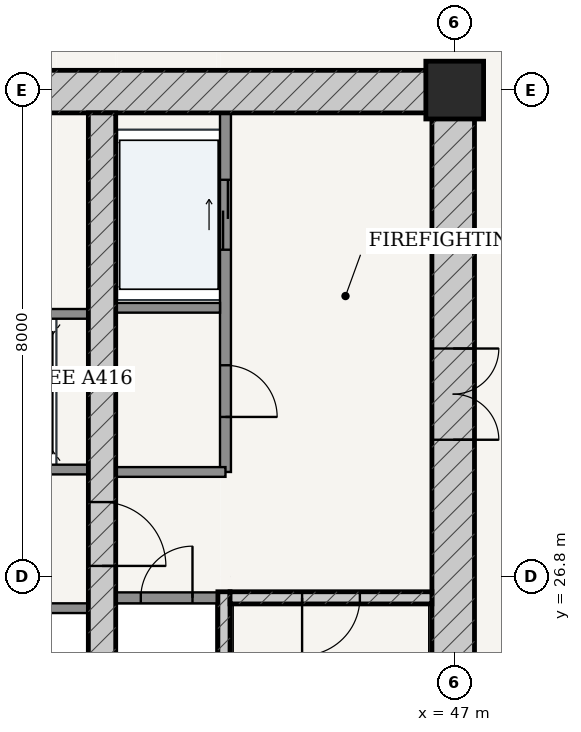
"""IFC4 building model, lengths in metres.
Left out: names, types, materials, properties, quantities, classifications, styles, units other than length and angle.
Written with IfcOpenShell. Run it as: python <this file> out.ifc"""

import sys

from ifc_helpers import new_model, si_unit, direction, frame, frame_2d, origin, origin_2d, place, context, subcontext, project, spatial, rectangle, extrude, source, transform, mapped, element, fill, save


model = new_model("IFC4")
c1 = context("Model", 3, precision=1e-05, world=origin(), true_north=direction((-0.2419218956, 0.970295726276)))
c2 = subcontext(c1, "Body", "Model", "MODEL_VIEW")
j1 = project(units=[si_unit("LENGTHUNIT", "METRE"), si_unit("PLANEANGLEUNIT", "RADIAN")], contexts=[c1])
p1 = place(None, origin())
s1 = spatial("IfcSite", under=j1, at=p1, CompositionType="ELEMENT")
p2 = place(p1, origin())
s2 = spatial("IfcBuilding", under=s1, at=p2, CompositionType="ELEMENT")
p3 = place(p2, frame((0.0, 0.0, 90.6)))
s3 = spatial("IfcBuildingStorey", under=s2, at=p3, CompositionType="ELEMENT", Elevation=90.6)
p4 = place(p3, frame((47.0, 34.8, 0.0), z_axis=(0.0, 0.0, 1.0), x_axis=(1.0, 0.0, 0.0)))
e1 = element("IfcColumn", 1, at=p4, inside=s3, PredefinedType="COLUMN", context=c2, shape_type="SweptSolid", body=[
    extrude(rectangle(XDim=0.95, YDim=0.95, at=origin_2d()), origin(), (0.0, 0.0, 1.0), 3.6),
])
p5 = place(p3, frame((28.675, 34.775, 0.0), z_axis=(0.0, 0.0, 1.0), x_axis=(1.0, 0.0, 0.0)))
e2 = element("IfcWall", 2, at=p5, inside=s3, PredefinedType="SHEAR", context=c2, shape_type="SweptSolid", body=[
    extrude(rectangle(XDim=18.65, YDim=0.7, at=frame_2d((9.325, 0.0))), origin(), (0.0, 0.0, 1.0), 3.325),
])
p6 = place(p5, frame((8.9, 0.0, 0.0)))
e3 = element("IfcOpeningElement", 3, at=p6, cuts=e2, PredefinedType="OPENING", context=c2, shape_type="SweptSolid", body=[
    extrude(rectangle(XDim=0.85, YDim=2.1, at=frame_2d((0.425, 1.05))), frame((0.0, 0.36, 0.0), z_axis=(0.0, -1.0, 0.0), x_axis=(1.0, 0.0, 0.0)), (0.0, 0.0, 1.0), 0.72),
])
p7 = place(p3, frame((46.975, 19.175, 0.0), z_axis=(0.0, 0.0, 1.0), x_axis=(0.0, 1.0, 0.0)))
e4 = element("IfcWall", 4, at=p7, inside=s3, PredefinedType="SHEAR", context=c2, shape_type="SweptSolid", body=[
    extrude(rectangle(XDim=15.25, YDim=0.7, at=frame_2d((7.625, 0.0))), origin(), (0.0, 0.0, 1.0), 3.325),
])
p8 = place(p7, frame((9.875, 0.0, 0.0)))
e5 = element("IfcOpeningElement", 5, at=p8, cuts=e4, PredefinedType="OPENING", context=c2, shape_type="SweptSolid", body=[
    extrude(rectangle(XDim=1.5, YDim=2.2, at=frame_2d((0.75, 1.1))), frame((0.0, 0.36, 0.0), z_axis=(0.0, -1.0, 0.0), x_axis=(1.0, 0.0, 0.0)), (0.0, 0.0, 1.0), 0.72),
])
p9 = place(p3, frame((43.205, 19.175, 0.0), z_axis=(0.0, 0.0, 1.0), x_axis=(0.0, 1.0, 0.0)))
e6 = element("IfcWall", 6, at=p9, inside=s3, PredefinedType="SOLIDWALL", context=c2, shape_type="SweptSolid", body=[
    extrude(rectangle(XDim=7.375, YDim=0.2, at=frame_2d((3.688, 0.0))), origin(), (0.0, 0.0, 1.0), 3.325),
])
p10 = place(p3, frame((43.305, 26.45, 0.0), z_axis=(0.0, 0.0, 1.0), x_axis=(1.0, 0.0, 0.0)))
e7 = element("IfcWall", 7, at=p10, inside=s3, PredefinedType="SOLIDWALL", context=c2, shape_type="SweptSolid", body=[
    extrude(rectangle(XDim=3.32, YDim=0.2, at=frame_2d((1.66, 0.0))), origin(), (0.0, 0.0, 1.0), 3.325),
])
p11 = place(p10, frame((1.185, 0.0, 0.0)))
e8 = element("IfcOpeningElement", 8, at=p11, cuts=e7, PredefinedType="OPENING", context=c2, shape_type="SweptSolid", body=[
    extrude(rectangle(XDim=0.95, YDim=2.15, at=frame_2d((0.475, 1.075))), frame((0.0, 0.11, 0.0), z_axis=(0.0, -1.0, 0.0), x_axis=(1.0, 0.0, 0.0)), (0.0, 0.0, 1.0), 0.22),
])
p12 = place(p3, frame((41.2, 19.175, 0.0), z_axis=(0.0, 0.0, 1.0), x_axis=(0.0, 1.0, 0.0)))
e9 = element("IfcWall", 9, at=p12, inside=s3, PredefinedType="SHEAR", context=c2, shape_type="SweptSolid", body=[
    extrude(rectangle(XDim=15.25, YDim=0.45, at=frame_2d((7.625, 0.0))), origin(), (0.0, 0.0, 1.0), 3.325),
])
p13 = place(p12, frame((7.8, 0.0, 0.0)))
e10 = element("IfcOpeningElement", 10, at=p13, cuts=e9, PredefinedType="OPENING", context=c2, shape_type="SweptSolid", body=[
    extrude(rectangle(XDim=1.05, YDim=2.15, at=frame_2d((0.525, 1.075))), frame((0.0, 0.235, 0.0), z_axis=(0.0, -1.0, 0.0), x_axis=(1.0, 0.0, 0.0)), (0.0, 0.0, 1.0), 0.47),
])
p14 = place(p3, frame((41.425, 26.45, 0.0), z_axis=(0.0, 0.0, 1.0), x_axis=(1.0, 0.0, 0.0)))
e11 = element("IfcWall", 11, at=p14, inside=s3, PredefinedType="PARTITIONING", context=c2, shape_type="SweptSolid", body=[
    extrude(rectangle(XDim=1.675, YDim=0.18, at=frame_2d((0.837, 0.0))), origin(), (0.0, 0.0, 1.0), 3.325),
])
p15 = place(p14, frame((0.413, 0.0, 0.0)))
e12 = element("IfcOpeningElement", 12, at=p15, cuts=e11, PredefinedType="OPENING", context=c2, shape_type="SweptSolid", body=[
    extrude(rectangle(XDim=0.85, YDim=2.1, at=frame_2d((0.425, 1.05))), frame((0.0, 0.1, 0.0), z_axis=(0.0, -1.0, 0.0), x_axis=(1.0, 0.0, 0.0)), (0.0, 0.0, 1.0), 0.2),
])
p16 = place(p3, frame((43.23, 28.52, 0.0), z_axis=(0.0, 0.0, 1.0), x_axis=(0.0, 1.0, 0.0)))
e13 = element("IfcWall", 13, at=p16, inside=s3, PredefinedType="PARTITIONING", context=c2, shape_type="SweptSolid", body=[
    extrude(rectangle(XDim=5.905, YDim=0.18, at=frame_2d((2.953, 0.0))), origin(), (0.0, 0.0, 1.0), 3.325),
])
p17 = place(p16, frame((0.905, 0.0, 0.0)))
e14 = element("IfcOpeningElement", 14, at=p17, cuts=e13, PredefinedType="OPENING", context=c2, shape_type="SweptSolid", body=[
    extrude(rectangle(XDim=0.85, YDim=2.1, at=frame_2d((0.425, 1.05))), frame((0.0, 0.1, 0.0), z_axis=(0.0, -1.0, 0.0), x_axis=(1.0, 0.0, 0.0)), (0.0, 0.0, 1.0), 0.2),
])
p18 = place(p16, frame((3.655, 0.0, 0.0)))
e15 = element("IfcOpeningElement", 15, at=p18, cuts=e13, PredefinedType="OPENING", context=c2, shape_type="SweptSolid", body=[
    extrude(rectangle(XDim=1.15, YDim=2.2, at=frame_2d((0.575, 1.1))), frame((0.0, 0.1, 0.0), z_axis=(0.0, -1.0, 0.0), x_axis=(1.0, 0.0, 0.0)), (0.0, 0.0, 1.0), 0.2),
])
p19 = place(p3, frame((41.425, 31.22, 0.0), z_axis=(0.0, 0.0, 1.0), x_axis=(1.0, 0.0, 0.0)))
e16 = element("IfcWall", 16, at=p19, inside=s3, PredefinedType="PARTITIONING", context=c2, shape_type="SweptSolid", body=[
    extrude(rectangle(XDim=1.715, YDim=0.16, at=frame_2d((0.857, 0.0))), origin(), (0.0, 0.0, 1.0), 3.325),
])
p20 = place(p3, frame((41.425, 28.52, 0.0), z_axis=(0.0, 0.0, 1.0), x_axis=(1.0, 0.0, 0.0)))
e17 = element("IfcWall", 17, at=p20, inside=s3, PredefinedType="PARTITIONING", context=c2, shape_type="SweptSolid", body=[
    extrude(rectangle(XDim=1.805, YDim=0.16, at=frame_2d((0.902, 0.0))), origin(), (0.0, 0.0, 1.0), 3.325),
])
p21 = place(p3, frame((35.025, 28.56, 0.0), z_axis=(0.0, 0.0, 1.0), x_axis=(1.0, 0.0, 0.0)))
e18 = element("IfcWall", 18, at=p21, inside=s3, PredefinedType="PARTITIONING", context=c2, shape_type="SweptSolid", body=[
    extrude(rectangle(XDim=5.95, YDim=0.16, at=frame_2d((2.975, 0.0))), origin(), (0.0, 0.0, 1.0), 3.325),
])
p22 = place(p21, frame((0.76, 0.0, 0.0)))
e19 = element("IfcOpeningElement", 19, at=p22, cuts=e18, PredefinedType="OPENING", context=c2, shape_type="SweptSolid", body=[
    extrude(rectangle(XDim=1.1, YDim=2.2, at=frame_2d((0.55, 1.1))), frame((0.0, 0.09, 0.0), z_axis=(0.0, -1.0, 0.0), x_axis=(1.0, 0.0, 0.0)), (0.0, 0.0, 1.0), 0.18),
])
p23 = place(p21, frame((2.425, 0.0, 0.0)))
e20 = element("IfcOpeningElement", 20, at=p23, cuts=e18, PredefinedType="OPENING", context=c2, shape_type="SweptSolid", body=[
    extrude(rectangle(XDim=1.1, YDim=2.2, at=frame_2d((0.55, 1.1))), frame((0.0, 0.09, 0.0), z_axis=(0.0, -1.0, 0.0), x_axis=(1.0, 0.0, 0.0)), (0.0, 0.0, 1.0), 0.18),
])
p24 = place(p21, frame((4.09, 0.0, 0.0)))
e21 = element("IfcOpeningElement", 21, at=p24, cuts=e18, PredefinedType="OPENING", context=c2, shape_type="SweptSolid", body=[
    extrude(rectangle(XDim=1.1, YDim=2.2, at=frame_2d((0.55, 1.1))), frame((0.0, 0.09, 0.0), z_axis=(0.0, -1.0, 0.0), x_axis=(1.0, 0.0, 0.0)), (0.0, 0.0, 1.0), 0.18),
])
for number, where, z_axis, x_axis in (
    (22, (35.025, 31.12, 0.0), (0.0, 0.0, 1.0), (1.0, 0.0, 0.0)),
    (23, (35.025, 26.28, 0.0), (0.0, 0.0, 1.0), (1.0, 0.0, 0.0)),
):
    element("IfcWall", number, at=place(p3, frame(where, z_axis=z_axis, x_axis=x_axis)), inside=s3, PredefinedType="PARTITIONING", context=c2, shape_type="SweptSolid", body=[
        extrude(rectangle(XDim=5.95, YDim=0.16, at=frame_2d((2.975, 0.0))), origin(), (0.0, 0.0, 1.0), 3.325),
    ])
m1 = source(origin(), c2, "Body", "SweptSolid", [
    extrude(rectangle(XDim=1.5, YDim=2.2, at=frame_2d((0.75, 1.1))), frame((0.0, 0.025, 0.0), z_axis=(0.0, -1.0, 0.0), x_axis=(1.0, 0.0, 0.0)), (0.0, 0.0, 1.0), 0.05),
])
p25 = place(p8, frame((1.5, 0.0, 0.0), z_axis=(0.0, 0.0, 1.0), x_axis=(-1.0, 0.0, 0.0)))
e24 = element("IfcDoor", 24, at=p25, inside=s3, OperationType="DOUBLE_DOOR_SINGLE_SWING", PredefinedType="DOOR", context=c2, shape_type="MappedRepresentation", body=[
    mapped(m1, transform((0.0, 0.0, 0.0), scale=1.0)),
])
fill(e5, e24)
m2 = source(origin(), c2, "Body", "SweptSolid", [
    extrude(rectangle(XDim=1.05, YDim=2.15, at=frame_2d((0.525, 1.075))), frame((0.0, 0.025, 0.0), z_axis=(0.0, -1.0, 0.0), x_axis=(1.0, 0.0, 0.0)), (0.0, 0.0, 1.0), 0.05),
])
p26 = place(p13, frame((1.05, 0.0, 0.0), z_axis=(0.0, 0.0, 1.0), x_axis=(-1.0, 0.0, 0.0)))
e25 = element("IfcDoor", 25, at=p26, inside=s3, OperationType="SINGLE_SWING_RIGHT", PredefinedType="DOOR", context=c2, shape_type="MappedRepresentation", body=[
    mapped(m2, transform((0.0, 0.0, 0.0), scale=1.0)),
])
fill(e10, e25)
m3 = source(origin(), c2, "Body", "SweptSolid", [
    extrude(rectangle(XDim=0.95, YDim=2.15, at=frame_2d((0.475, 1.075))), frame((0.0, 0.025, 0.0), z_axis=(0.0, -1.0, 0.0), x_axis=(1.0, 0.0, 0.0)), (0.0, 0.0, 1.0), 0.05),
])
p27 = place(p11, frame((0.95, 0.0, 0.0), z_axis=(0.0, 0.0, 1.0), x_axis=(-1.0, 0.0, 0.0)))
e26 = element("IfcDoor", 26, at=p27, inside=s3, OperationType="SINGLE_SWING_RIGHT", PredefinedType="DOOR", context=c2, shape_type="MappedRepresentation", body=[
    mapped(m3, transform((0.0, 0.0, 0.0), scale=1.0)),
])
fill(e8, e26)
m4 = source(origin(), c2, "Body", "SweptSolid", [
    extrude(rectangle(XDim=0.85, YDim=2.1, at=frame_2d((0.425, 1.05))), frame((0.0, 0.025, 0.0), z_axis=(0.0, -1.0, 0.0), x_axis=(1.0, 0.0, 0.0)), (0.0, 0.0, 1.0), 0.05),
])
p28 = place(p15, origin())
e27 = element("IfcDoor", 27, at=p28, inside=s3, OperationType="SINGLE_SWING_RIGHT", PredefinedType="DOOR", context=c2, shape_type="MappedRepresentation", body=[
    mapped(m4, transform((0.0, 0.0, 0.0), scale=1.0)),
])
fill(e12, e27)
p29 = place(p17, frame((0.85, 0.0, 0.0), z_axis=(0.0, 0.0, 1.0), x_axis=(-1.0, 0.0, 0.0)))
e28 = element("IfcDoor", 28, at=p29, inside=s3, OperationType="SINGLE_SWING_RIGHT", PredefinedType="DOOR", context=c2, shape_type="MappedRepresentation", body=[
    mapped(m4, transform((0.0, 0.0, 0.0), scale=1.0)),
])
fill(e14, e28)
m5 = source(origin(), c2, "Body", "SweptSolid", [
    extrude(rectangle(XDim=1.15, YDim=2.2, at=frame_2d((0.575, 1.1))), frame((0.0, 0.025, 0.0), z_axis=(0.0, -1.0, 0.0), x_axis=(1.0, 0.0, 0.0)), (0.0, 0.0, 1.0), 0.05),
])
p30 = place(p18, origin())
e29 = element("IfcDoor", 29, at=p30, inside=s3, OperationType="DOUBLE_DOOR_SLIDING", PredefinedType="DOOR", context=c2, shape_type="MappedRepresentation", body=[
    mapped(m5, transform((0.0, 0.0, 0.0), scale=1.0)),
])
fill(e15, e29)
save(model, sys.argv[1])
